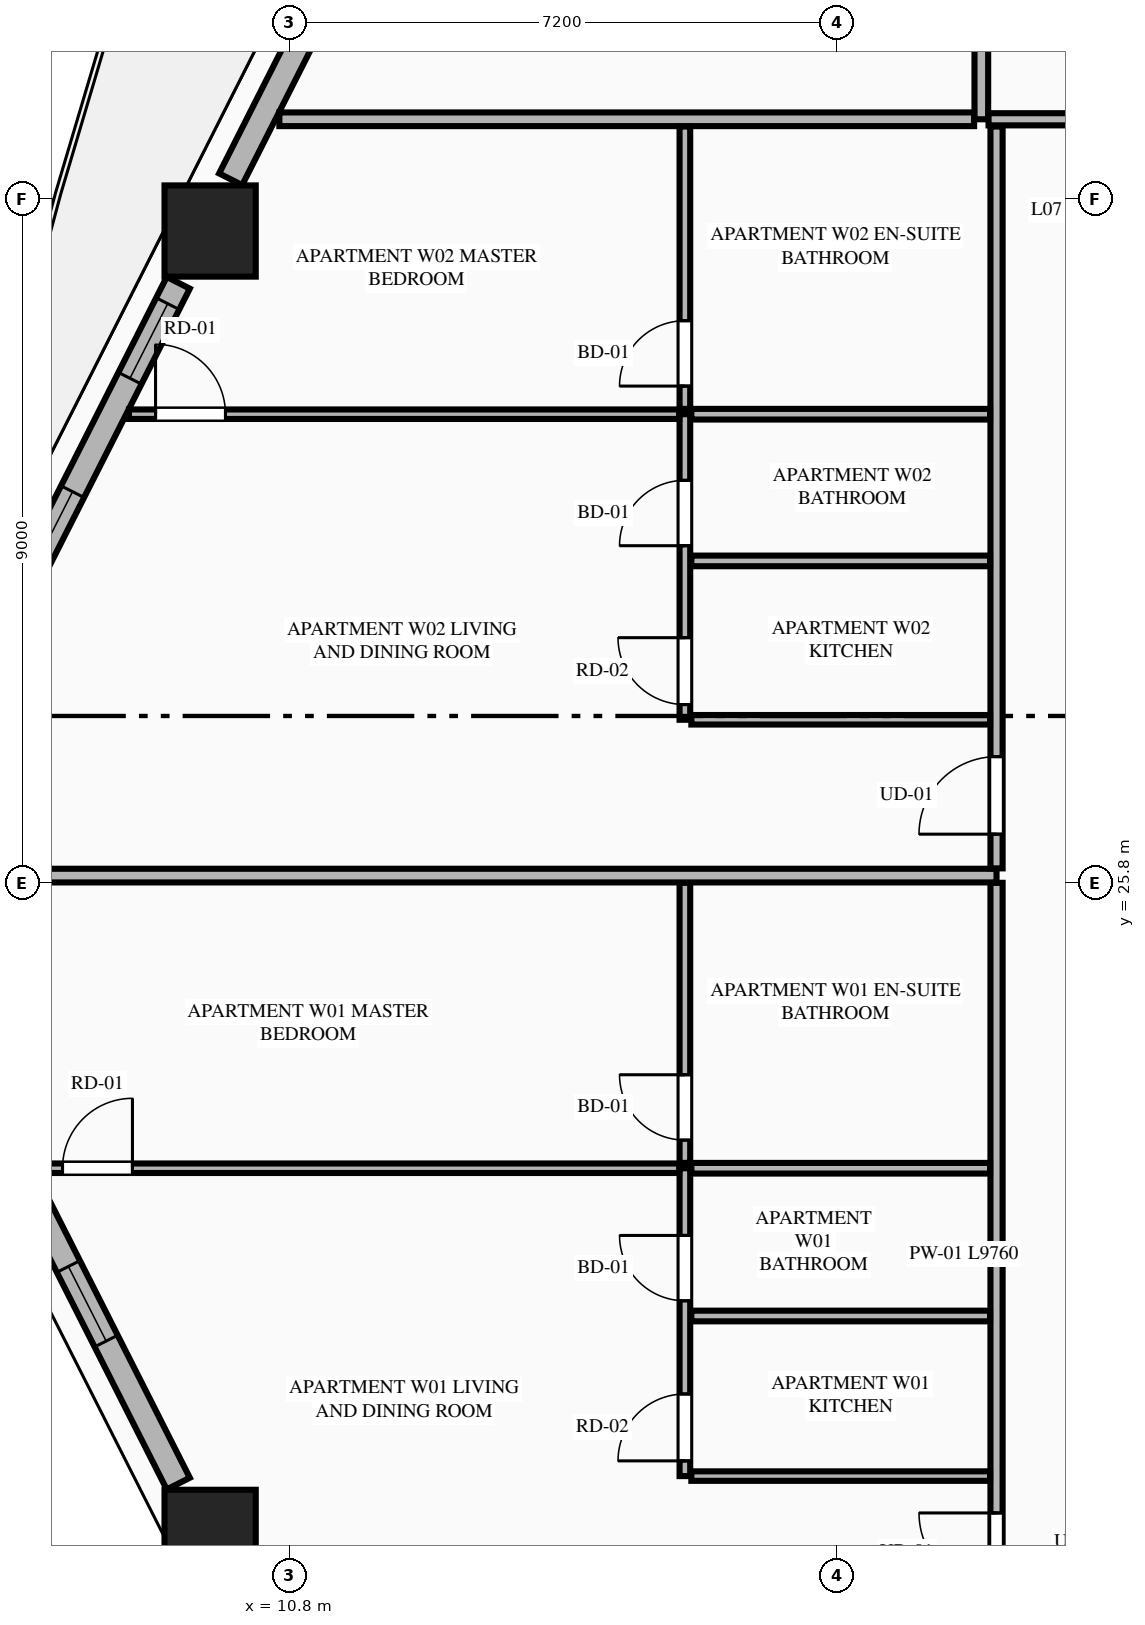
"""IFC4 building model, lengths in metres.
Left out: names, types, materials, properties, quantities, classifications, styles, units other than length and angle.
Written with IfcOpenShell. Run it as: python <this file> out.ifc"""

import sys

from ifc_helpers import new_model, si_unit, direction, frame, frame_2d, origin, origin_2d, place, context, subcontext, project, spatial, rectangle, extrude, element, fill, save


model = new_model("IFC4")
c1 = context("Model", 3, precision=1e-05, world=origin(), true_north=direction((0.0, 1.0)))
c2 = subcontext(c1, "Body", "Model", "MODEL_VIEW")
j1 = project(units=[si_unit("LENGTHUNIT", "METRE"), si_unit("PLANEANGLEUNIT", "RADIAN")], contexts=[c1])
p1 = place(None, origin())
s1 = spatial("IfcSite", under=j1, at=p1, CompositionType="ELEMENT")
p2 = place(p1, origin())
s2 = spatial("IfcBuilding", under=s1, at=p2, CompositionType="ELEMENT")
p3 = place(p2, frame((0.0, 0.0, 32.0)))
s3 = spatial("IfcBuildingStorey", under=s2, at=p3, CompositionType="ELEMENT", Elevation=32.0)
for number, where, z_axis, x_axis in (
    (1, (9.754, 34.38, 0.0), (0.0, 0.0, 1.0), (1.0, 0.0, 0.0)),
    (2, (9.754, 17.22, 0.0), (0.0, 0.0, 1.0), (1.0, 0.0, 0.0)),
):
    element("IfcColumn", number, at=place(p3, frame(where, z_axis=z_axis, x_axis=x_axis)), inside=s3, PredefinedType="COLUMN", context=c2, shape_type="SweptSolid", body=[
        extrude(rectangle(XDim=1.2, YDim=1.2, at=origin_2d()), origin(), (0.0, 0.0, 1.0), 3.55),
    ])
p4 = place(p3, frame((12.529, 40.01, 0.0), z_axis=(0.0, 0.0, 1.0), x_axis=(-0.451627137896, -0.892206774417, 0.0)))
e3 = element("IfcWall", 3, at=p4, inside=s3, PredefinedType="STANDARD", context=c2, shape_type="SweptSolid", body=[
    extrude(rectangle(XDim=5.547, YDim=0.34, at=frame_2d((2.773, 0.0))), origin(), (0.0, 0.0, 1.0), 2.787),
])
p5 = place(p4, frame((1.656, 0.0, 0.0)))
e4 = element("IfcOpeningElement", 4, at=p5, cuts=e3, PredefinedType="OPENING", context=c2, shape_type="SweptSolid", body=[
    extrude(rectangle(XDim=1.1, YDim=2.25, at=frame_2d((0.55, 1.125))), frame((0.0, 0.18, 0.0), z_axis=(0.0, -1.0, 0.0), x_axis=(1.0, 0.0, 0.0)), (0.0, 0.0, 1.0), 0.36),
])
p6 = place(p3, frame((9.335, 33.699, 0.0), z_axis=(0.0, 0.0, 1.0), x_axis=(-0.451590635984, -0.892225250422, 0.0)))
e5 = element("IfcWall", 5, at=p6, inside=s3, PredefinedType="STANDARD", context=c2, shape_type="SweptSolid", body=[
    extrude(rectangle(XDim=5.303, YDim=0.34, at=frame_2d((2.652, 0.0))), origin(), (0.0, 0.0, 1.0), 2.787),
])
p7 = place(p6, frame((0.308, 0.0, 0.75)))
e6 = element("IfcOpeningElement", 6, at=p7, cuts=e5, PredefinedType="OPENING", context=c2, shape_type="SweptSolid", body=[
    extrude(rectangle(XDim=1.1, YDim=1.887, at=frame_2d((0.55, 0.943))), frame((0.0, 0.18, 0.0), z_axis=(0.0, -1.0, 0.0), x_axis=(1.0, 0.0, 0.0)), (0.0, 0.0, 1.0), 0.36),
])
p8 = place(p6, frame((3.08, 0.0, 0.75)))
e7 = element("IfcOpeningElement", 7, at=p8, cuts=e5, PredefinedType="OPENING", context=c2, shape_type="SweptSolid", body=[
    extrude(rectangle(XDim=1.1, YDim=1.887, at=frame_2d((0.55, 0.943))), frame((0.0, 0.18, 0.0), z_axis=(0.0, -1.0, 0.0), x_axis=(1.0, 0.0, 0.0)), (0.0, 0.0, 1.0), 0.36),
])
p9 = place(p3, frame((6.94, 22.633, 0.0), z_axis=(0.0, 0.0, 1.0), x_axis=(0.451572088722, -0.892234637686, 0.0)))
e8 = element("IfcWall", 8, at=p9, inside=s3, PredefinedType="STANDARD", context=c2, shape_type="SweptSolid", body=[
    extrude(rectangle(XDim=5.304, YDim=0.34, at=frame_2d((2.652, 0.0))), origin(), (0.0, 0.0, 1.0), 2.787),
])
p10 = place(p9, frame((2.102, 0.0, 0.75)))
e9 = element("IfcOpeningElement", 9, at=p10, cuts=e8, PredefinedType="OPENING", context=c2, shape_type="SweptSolid", body=[
    extrude(rectangle(XDim=1.1, YDim=1.887, at=frame_2d((0.55, 0.943))), frame((0.0, 0.18, 0.0), z_axis=(0.0, -1.0, 0.0), x_axis=(1.0, 0.0, 0.0)), (0.0, 0.0, 1.0), 0.36),
])
p11 = place(p3, frame((19.9, 35.85, 0.0), z_axis=(0.0, 0.0, 1.0), x_axis=(0.0, 1.0, 0.0)))
e10 = element("IfcWall", 10, at=p11, inside=s3, PredefinedType="PARTITIONING", context=c2, shape_type="SweptSolid", body=[
    extrude(rectangle(XDim=13.295, YDim=0.18, at=frame_2d((6.647, 0.0))), origin(), (0.0, 0.0, 1.0), 3.33),
])
p12 = place(p3, frame((19.995, 35.85, 0.0), z_axis=(0.0, 0.0, 1.0), x_axis=(1.0, 0.0, 0.0)))
e11 = element("IfcWall", 11, at=p12, inside=s3, PredefinedType="PARTITIONING", context=c2, shape_type="SweptSolid", body=[
    extrude(rectangle(XDim=16.432, YDim=0.16, at=frame_2d((8.216, 0.0))), origin(), (0.0, 0.0, 1.0), 3.33),
])
p13 = place(p12, frame((14.577, 0.0, 0.0)))
e12 = element("IfcOpeningElement", 12, at=p13, cuts=e11, PredefinedType="OPENING", context=c2, shape_type="SweptSolid", body=[
    extrude(rectangle(XDim=1.02, YDim=2.25, at=frame_2d((0.51, 1.125))), frame((0.0, 0.09, 0.0), z_axis=(0.0, -1.0, 0.0), x_axis=(1.0, 0.0, 0.0)), (0.0, 0.0, 1.0), 0.18),
])
p14 = place(p3, frame((10.665, 35.85, 0.0), z_axis=(0.0, 0.0, 1.0), x_axis=(1.0, 0.0, 0.0)))
e13 = element("IfcWall", 13, at=p14, inside=s3, PredefinedType="PARTITIONING", context=c2, shape_type="SweptSolid", body=[
    extrude(rectangle(XDim=9.14, YDim=0.18, at=frame_2d((4.57, 0.0))), origin(), (0.0, 0.0, 1.0), 3.33),
])
p15 = place(p3, frame((20.1, 16.045, 0.0), z_axis=(0.0, 0.0, 1.0), x_axis=(0.0, 1.0, 0.0)))
e14 = element("IfcWall", 14, at=p15, inside=s3, PredefinedType="PARTITIONING", context=c2, shape_type="SweptSolid", body=[
    extrude(rectangle(XDim=9.76, YDim=0.16, at=frame_2d((4.88, 0.0))), origin(), (0.0, 0.0, 1.0), 3.33),
])
p16 = place(p15, frame((0.45, 0.0, 0.0)))
e15 = element("IfcOpeningElement", 15, at=p16, cuts=e14, PredefinedType="OPENING", context=c2, shape_type="SweptSolid", body=[
    extrude(rectangle(XDim=1.02, YDim=2.25, at=frame_2d((0.51, 1.125))), frame((0.0, 0.09, 0.0), z_axis=(0.0, -1.0, 0.0), x_axis=(1.0, 0.0, 0.0)), (0.0, 0.0, 1.0), 0.18),
])
p17 = place(p3, frame((16.085, 18.0, 0.0), z_axis=(0.0, 0.0, 1.0), x_axis=(1.0, 0.0, 0.0)))
e16 = element("IfcWall", 16, at=p17, inside=s3, PredefinedType="PARTITIONING", context=c2, shape_type="SweptSolid", body=[
    extrude(rectangle(XDim=3.93, YDim=0.125, at=frame_2d((1.965, 0.0))), origin(), (0.0, 0.0, 1.0), 2.636),
])
p18 = place(p3, frame((16.0, 18.0, 0.0), z_axis=(0.0, 0.0, 1.0), x_axis=(0.0, 1.0, 0.0)))
e17 = element("IfcWall", 17, at=p18, inside=s3, PredefinedType="PLUMBINGWALL", context=c2, shape_type="SweptSolid", body=[
    extrude(rectangle(XDim=4.05, YDim=0.14, at=frame_2d((2.025, 0.0))), origin(), (0.0, 0.0, 1.0), 3.33),
])
p19 = place(p18, frame((0.2, 0.0, 0.0)))
e18 = element("IfcOpeningElement", 18, at=p19, cuts=e17, PredefinedType="OPENING", context=c2, shape_type="SweptSolid", body=[
    extrude(rectangle(XDim=0.88, YDim=2.15, at=frame_2d((0.44, 1.075))), frame((0.0, 0.08, 0.0), z_axis=(0.0, -1.0, 0.0), x_axis=(1.0, 0.0, 0.0)), (0.0, 0.0, 1.0), 0.16),
])
p20 = place(p18, frame((2.306, 0.0, 0.0)))
e19 = element("IfcOpeningElement", 19, at=p20, cuts=e17, PredefinedType="OPENING", context=c2, shape_type="SweptSolid", body=[
    extrude(rectangle(XDim=0.86, YDim=2.1, at=frame_2d((0.43, 1.05))), frame((0.0, 0.08, 0.0), z_axis=(0.0, -1.0, 0.0), x_axis=(1.0, 0.0, 0.0)), (0.0, 0.0, 1.0), 0.16),
])
p21 = place(p3, frame((16.0, 22.12, 0.0), z_axis=(0.0, 0.0, 1.0), x_axis=(0.0, 1.0, 0.0)))
e20 = element("IfcWall", 20, at=p21, inside=s3, PredefinedType="PLUMBINGWALL", context=c2, shape_type="SweptSolid", body=[
    extrude(rectangle(XDim=3.685, YDim=0.14, at=frame_2d((1.842, 0.0))), origin(), (0.0, 0.0, 1.0), 3.33),
])
p22 = place(p21, frame((0.3, 0.0, 0.0)))
e21 = element("IfcOpeningElement", 21, at=p22, cuts=e20, PredefinedType="OPENING", context=c2, shape_type="SweptSolid", body=[
    extrude(rectangle(XDim=0.86, YDim=2.1, at=frame_2d((0.43, 1.05))), frame((0.0, 0.08, 0.0), z_axis=(0.0, -1.0, 0.0), x_axis=(1.0, 0.0, 0.0)), (0.0, 0.0, 1.0), 0.16),
])
p23 = place(p3, frame((16.085, 22.05, 0.0), z_axis=(0.0, 0.0, 1.0), x_axis=(1.0, 0.0, 0.0)))
e22 = element("IfcWall", 22, at=p23, inside=s3, PredefinedType="PLUMBINGWALL", context=c2, shape_type="SweptSolid", body=[
    extrude(rectangle(XDim=3.93, YDim=0.14, at=frame_2d((1.965, 0.0))), origin(), (0.0, 0.0, 1.0), 3.33),
])
p24 = place(p3, frame((7.462, 22.05, 0.0), z_axis=(0.0, 0.0, 1.0), x_axis=(1.0, 0.0, 0.0)))
e23 = element("IfcWall", 23, at=p24, inside=s3, PredefinedType="PARTITIONING", context=c2, shape_type="SweptSolid", body=[
    extrude(rectangle(XDim=8.463, YDim=0.125, at=frame_2d((4.231, 0.0))), origin(), (0.0, 0.0, 1.0), 3.33),
])
p25 = place(p24, frame((0.35, 0.0, 0.0)))
e24 = element("IfcOpeningElement", 24, at=p25, cuts=e23, PredefinedType="OPENING", context=c2, shape_type="SweptSolid", body=[
    extrude(rectangle(XDim=0.92, YDim=2.15, at=frame_2d((0.46, 1.075))), frame((0.0, 0.073, 0.0), z_axis=(0.0, -1.0, 0.0), x_axis=(1.0, 0.0, 0.0)), (0.0, 0.0, 1.0), 0.145),
])
p26 = place(p3, frame((16.085, 20.106, 0.0), z_axis=(0.0, 0.0, 1.0), x_axis=(1.0, 0.0, 0.0)))
e25 = element("IfcWall", 25, at=p26, inside=s3, PredefinedType="PLUMBINGWALL", context=c2, shape_type="SweptSolid", body=[
    extrude(rectangle(XDim=3.93, YDim=0.14, at=frame_2d((1.965, 0.0))), origin(), (0.0, 0.0, 1.0), 3.33),
])
p27 = place(p3, frame((6.087, 25.9, 0.0), z_axis=(0.0, 0.0, 1.0), x_axis=(1.0, 0.0, 0.0)))
e26 = element("IfcWall", 26, at=p27, inside=s3, PredefinedType="PARTITIONING", context=c2, shape_type="SweptSolid", body=[
    extrude(rectangle(XDim=14.013, YDim=0.18, at=frame_2d((7.007, 0.0))), origin(), (0.0, 0.0, 1.0), 3.33),
])
p28 = place(p3, frame((20.1, 25.995, 0.0), z_axis=(0.0, 0.0, 1.0), x_axis=(0.0, 1.0, 0.0)))
e27 = element("IfcWall", 27, at=p28, inside=s3, PredefinedType="PARTITIONING", context=c2, shape_type="SweptSolid", body=[
    extrude(rectangle(XDim=9.76, YDim=0.16, at=frame_2d((4.88, 0.0))), origin(), (0.0, 0.0, 1.0), 3.33),
])
p29 = place(p28, frame((0.45, 0.0, 0.0)))
e28 = element("IfcOpeningElement", 28, at=p29, cuts=e27, PredefinedType="OPENING", context=c2, shape_type="SweptSolid", body=[
    extrude(rectangle(XDim=1.02, YDim=2.25, at=frame_2d((0.51, 1.125))), frame((0.0, 0.09, 0.0), z_axis=(0.0, -1.0, 0.0), x_axis=(1.0, 0.0, 0.0)), (0.0, 0.0, 1.0), 0.18),
])
p30 = place(p3, frame((16.085, 27.95, 0.0), z_axis=(0.0, 0.0, 1.0), x_axis=(1.0, 0.0, 0.0)))
e29 = element("IfcWall", 29, at=p30, inside=s3, PredefinedType="PARTITIONING", context=c2, shape_type="SweptSolid", body=[
    extrude(rectangle(XDim=3.93, YDim=0.125, at=frame_2d((1.965, 0.0))), origin(), (0.0, 0.0, 1.0), 3.33),
])
p31 = place(p3, frame((16.0, 27.95, 0.0), z_axis=(0.0, 0.0, 1.0), x_axis=(0.0, 1.0, 0.0)))
e30 = element("IfcWall", 30, at=p31, inside=s3, PredefinedType="PLUMBINGWALL", context=c2, shape_type="SweptSolid", body=[
    extrude(rectangle(XDim=4.02, YDim=0.14, at=frame_2d((2.01, 0.0))), origin(), (0.0, 0.0, 1.0), 3.33),
])
p32 = place(p31, frame((0.2, 0.0, 0.0)))
e31 = element("IfcOpeningElement", 31, at=p32, cuts=e30, PredefinedType="OPENING", context=c2, shape_type="SweptSolid", body=[
    extrude(rectangle(XDim=0.88, YDim=2.15, at=frame_2d((0.44, 1.075))), frame((0.0, 0.08, 0.0), z_axis=(0.0, -1.0, 0.0), x_axis=(1.0, 0.0, 0.0)), (0.0, 0.0, 1.0), 0.16),
])
p33 = place(p31, frame((2.29, 0.0, 0.0)))
e32 = element("IfcOpeningElement", 32, at=p33, cuts=e30, PredefinedType="OPENING", context=c2, shape_type="SweptSolid", body=[
    extrude(rectangle(XDim=0.86, YDim=2.1, at=frame_2d((0.43, 1.05))), frame((0.0, 0.08, 0.0), z_axis=(0.0, -1.0, 0.0), x_axis=(1.0, 0.0, 0.0)), (0.0, 0.0, 1.0), 0.16),
])
p34 = place(p3, frame((16.0, 32.04, 0.0), z_axis=(0.0, 0.0, 1.0), x_axis=(0.0, 1.0, 0.0)))
e33 = element("IfcWall", 33, at=p34, inside=s3, PredefinedType="PLUMBINGWALL", context=c2, shape_type="SweptSolid", body=[
    extrude(rectangle(XDim=3.715, YDim=0.14, at=frame_2d((1.857, 0.0))), origin(), (0.0, 0.0, 1.0), 3.33),
])
p35 = place(p34, frame((0.3, 0.0, 0.0)))
e34 = element("IfcOpeningElement", 34, at=p35, cuts=e33, PredefinedType="OPENING", context=c2, shape_type="SweptSolid", body=[
    extrude(rectangle(XDim=0.86, YDim=2.1, at=frame_2d((0.43, 1.05))), frame((0.0, 0.08, 0.0), z_axis=(0.0, -1.0, 0.0), x_axis=(1.0, 0.0, 0.0)), (0.0, 0.0, 1.0), 0.16),
])
p36 = place(p3, frame((16.085, 31.97, 0.0), z_axis=(0.0, 0.0, 1.0), x_axis=(1.0, 0.0, 0.0)))
e35 = element("IfcWall", 35, at=p36, inside=s3, PredefinedType="PLUMBINGWALL", context=c2, shape_type="SweptSolid", body=[
    extrude(rectangle(XDim=3.93, YDim=0.14, at=frame_2d((1.965, 0.0))), origin(), (0.0, 0.0, 1.0), 3.33),
])
p37 = place(p3, frame((8.686, 31.97, 0.0), z_axis=(0.0, 0.0, 1.0), x_axis=(1.0, 0.0, 0.0)))
e36 = element("IfcWall", 36, at=p37, inside=s3, PredefinedType="PARTITIONING", context=c2, shape_type="SweptSolid", body=[
    extrude(rectangle(XDim=7.239, YDim=0.125, at=frame_2d((3.62, 0.0))), origin(), (0.0, 0.0, 1.0), 3.33),
])
p38 = place(p37, frame((0.35, 0.0, 0.0)))
e37 = element("IfcOpeningElement", 37, at=p38, cuts=e36, PredefinedType="OPENING", context=c2, shape_type="SweptSolid", body=[
    extrude(rectangle(XDim=0.92, YDim=2.15, at=frame_2d((0.46, 1.075))), frame((0.0, 0.073, 0.0), z_axis=(0.0, -1.0, 0.0), x_axis=(1.0, 0.0, 0.0)), (0.0, 0.0, 1.0), 0.145),
])
p39 = place(p3, frame((16.085, 30.04, 0.0), z_axis=(0.0, 0.0, 1.0), x_axis=(1.0, 0.0, 0.0)))
e38 = element("IfcWall", 38, at=p39, inside=s3, PredefinedType="PLUMBINGWALL", context=c2, shape_type="SweptSolid", body=[
    extrude(rectangle(XDim=3.93, YDim=0.14, at=frame_2d((1.965, 0.0))), origin(), (0.0, 0.0, 1.0), 3.33),
])
p40 = place(p7, origin())
e39 = element("IfcWindow", 39, at=p40, inside=s3, PartitioningType="SINGLE_PANEL", PredefinedType="WINDOW", context=c2, shape_type="SweptSolid", body=[
    extrude(rectangle(XDim=1.1, YDim=1.887, at=frame_2d((0.55, 0.943))), frame((0.0, 0.03, 0.0), z_axis=(0.0, -1.0, 0.0), x_axis=(1.0, 0.0, 0.0)), (0.0, 0.0, 1.0), 0.06),
])
fill(e6, e39)
p41 = place(p10, origin())
e40 = element("IfcWindow", 40, at=p41, inside=s3, PartitioningType="SINGLE_PANEL", PredefinedType="WINDOW", context=c2, shape_type="SweptSolid", body=[
    extrude(rectangle(XDim=1.1, YDim=1.887, at=frame_2d((0.55, 0.943))), frame((0.0, 0.03, 0.0), z_axis=(0.0, -1.0, 0.0), x_axis=(1.0, 0.0, 0.0)), (0.0, 0.0, 1.0), 0.06),
])
fill(e9, e40)
p42 = place(p19, origin())
e41 = element("IfcDoor", 41, at=p42, inside=s3, OperationType="SINGLE_SWING_LEFT", PredefinedType="DOOR", context=c2, shape_type="SweptSolid", body=[
    extrude(rectangle(XDim=0.88, YDim=2.15, at=frame_2d((0.44, 1.075))), frame((0.0, 0.025, 0.0), z_axis=(0.0, -1.0, 0.0), x_axis=(1.0, 0.0, 0.0)), (0.0, 0.0, 1.0), 0.05),
])
fill(e18, e41)
p43 = place(p20, origin())
e42 = element("IfcDoor", 42, at=p43, inside=s3, OperationType="SINGLE_SWING_RIGHT", PredefinedType="DOOR", context=c2, shape_type="SweptSolid", body=[
    extrude(rectangle(XDim=0.86, YDim=2.1, at=frame_2d((0.43, 1.05))), frame((0.0, 0.025, 0.0), z_axis=(0.0, -1.0, 0.0), x_axis=(1.0, 0.0, 0.0)), (0.0, 0.0, 1.0), 0.05),
])
fill(e19, e42)
p44 = place(p22, origin())
e43 = element("IfcDoor", 43, at=p44, inside=s3, OperationType="SINGLE_SWING_RIGHT", PredefinedType="DOOR", context=c2, shape_type="SweptSolid", body=[
    extrude(rectangle(XDim=0.86, YDim=2.1, at=frame_2d((0.43, 1.05))), frame((0.0, 0.025, 0.0), z_axis=(0.0, -1.0, 0.0), x_axis=(1.0, 0.0, 0.0)), (0.0, 0.0, 1.0), 0.05),
])
fill(e21, e43)
p45 = place(p16, origin())
e44 = element("IfcDoor", 44, at=p45, inside=s3, OperationType="SINGLE_SWING_RIGHT", PredefinedType="DOOR", context=c2, shape_type="SweptSolid", body=[
    extrude(rectangle(XDim=1.02, YDim=2.25, at=frame_2d((0.51, 1.125))), frame((0.0, 0.025, 0.0), z_axis=(0.0, -1.0, 0.0), x_axis=(1.0, 0.0, 0.0)), (0.0, 0.0, 1.0), 0.05),
])
fill(e15, e44)
p46 = place(p25, origin())
e45 = element("IfcDoor", 45, at=p46, inside=s3, OperationType="SINGLE_SWING_RIGHT", PredefinedType="DOOR", context=c2, shape_type="SweptSolid", body=[
    extrude(rectangle(XDim=0.92, YDim=2.15, at=frame_2d((0.46, 1.075))), frame((0.0, 0.025, 0.0), z_axis=(0.0, -1.0, 0.0), x_axis=(1.0, 0.0, 0.0)), (0.0, 0.0, 1.0), 0.05),
])
fill(e24, e45)
p47 = place(p32, origin())
e46 = element("IfcDoor", 46, at=p47, inside=s3, OperationType="SINGLE_SWING_RIGHT", PredefinedType="DOOR", context=c2, shape_type="SweptSolid", body=[
    extrude(rectangle(XDim=0.88, YDim=2.15, at=frame_2d((0.44, 1.075))), frame((0.0, 0.025, 0.0), z_axis=(0.0, -1.0, 0.0), x_axis=(1.0, 0.0, 0.0)), (0.0, 0.0, 1.0), 0.05),
])
fill(e31, e46)
p48 = place(p33, origin())
e47 = element("IfcDoor", 47, at=p48, inside=s3, OperationType="SINGLE_SWING_LEFT", PredefinedType="DOOR", context=c2, shape_type="SweptSolid", body=[
    extrude(rectangle(XDim=0.86, YDim=2.1, at=frame_2d((0.43, 1.05))), frame((0.0, 0.025, 0.0), z_axis=(0.0, -1.0, 0.0), x_axis=(1.0, 0.0, 0.0)), (0.0, 0.0, 1.0), 0.05),
])
fill(e32, e47)
p49 = place(p35, origin())
e48 = element("IfcDoor", 48, at=p49, inside=s3, OperationType="SINGLE_SWING_LEFT", PredefinedType="DOOR", context=c2, shape_type="SweptSolid", body=[
    extrude(rectangle(XDim=0.86, YDim=2.1, at=frame_2d((0.43, 1.05))), frame((0.0, 0.025, 0.0), z_axis=(0.0, -1.0, 0.0), x_axis=(1.0, 0.0, 0.0)), (0.0, 0.0, 1.0), 0.05),
])
fill(e34, e48)
p50 = place(p29, origin())
e49 = element("IfcDoor", 49, at=p50, inside=s3, OperationType="SINGLE_SWING_LEFT", PredefinedType="DOOR", context=c2, shape_type="SweptSolid", body=[
    extrude(rectangle(XDim=1.02, YDim=2.25, at=frame_2d((0.51, 1.125))), frame((0.0, 0.025, 0.0), z_axis=(0.0, -1.0, 0.0), x_axis=(1.0, 0.0, 0.0)), (0.0, 0.0, 1.0), 0.05),
])
fill(e28, e49)
p51 = place(p38, origin())
e50 = element("IfcDoor", 50, at=p51, inside=s3, OperationType="SINGLE_SWING_LEFT", PredefinedType="DOOR", context=c2, shape_type="SweptSolid", body=[
    extrude(rectangle(XDim=0.92, YDim=2.15, at=frame_2d((0.46, 1.075))), frame((0.0, 0.025, 0.0), z_axis=(0.0, -1.0, 0.0), x_axis=(1.0, 0.0, 0.0)), (0.0, 0.0, 1.0), 0.05),
])
fill(e37, e50)
p52 = place(p8, origin())
e51 = element("IfcWindow", 51, at=p52, inside=s3, PartitioningType="SINGLE_PANEL", PredefinedType="WINDOW", context=c2, shape_type="SweptSolid", body=[
    extrude(rectangle(XDim=1.1, YDim=1.887, at=frame_2d((0.55, 0.943))), frame((0.0, 0.03, 0.0), z_axis=(0.0, -1.0, 0.0), x_axis=(1.0, 0.0, 0.0)), (0.0, 0.0, 1.0), 0.06),
])
fill(e7, e51)
save(model, sys.argv[1])
